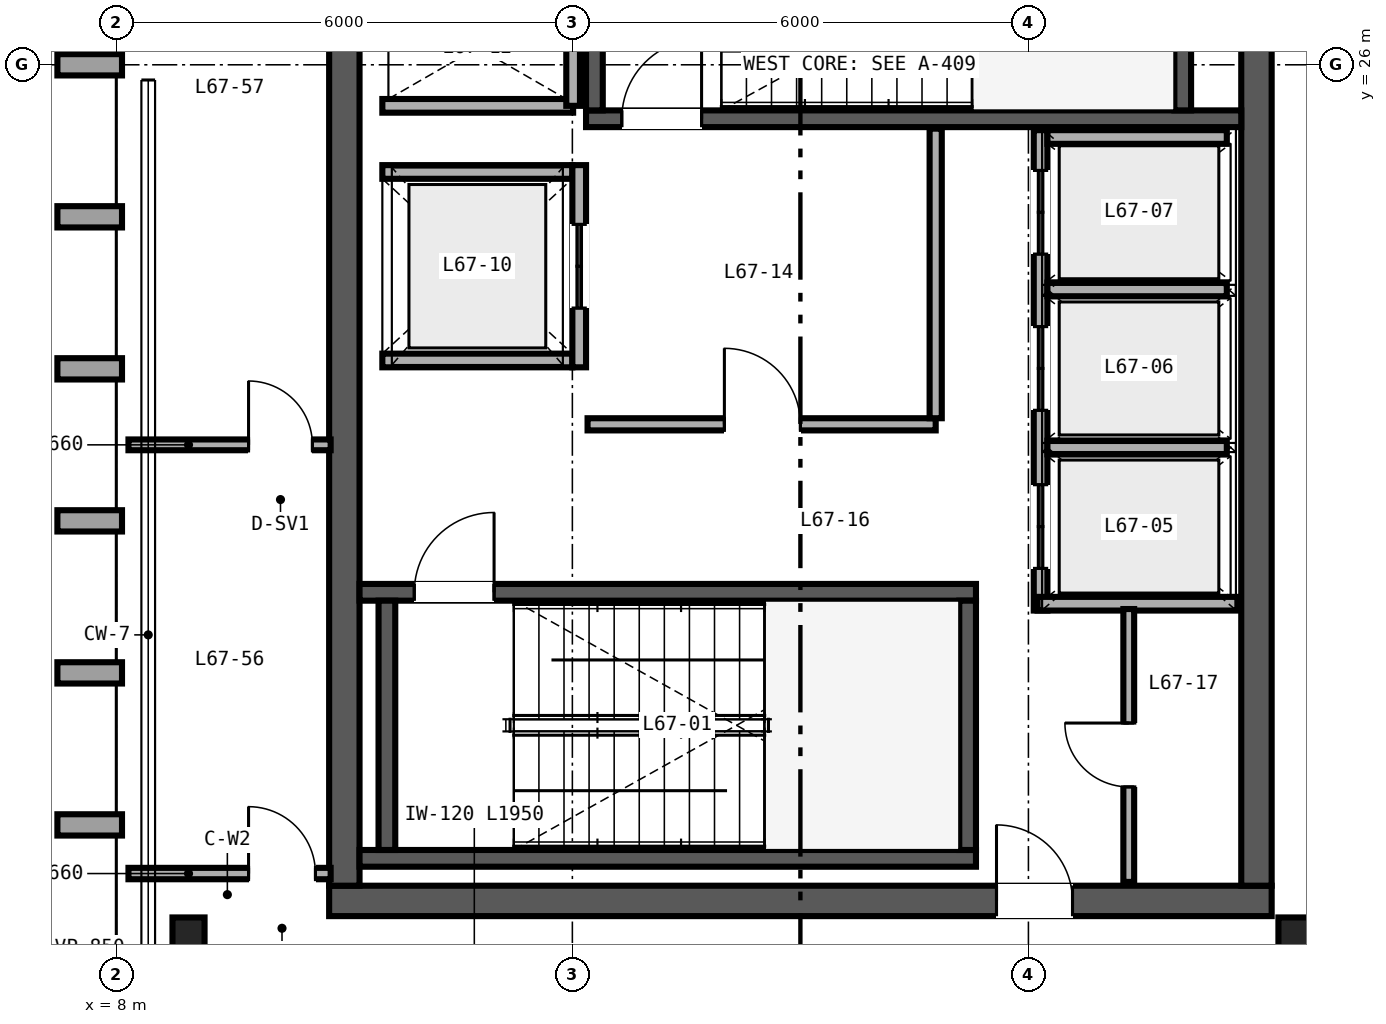
"""IFC4 building model, lengths in metres.
Left out: names, types, materials, properties, quantities, classifications, styles, units other than length and angle.
Written with IfcOpenShell. Run it as: python <this file> out.ifc"""

import sys

from ifc_helpers import new_model, si_unit, direction, frame, frame_2d, origin, origin_2d, place, context, subcontext, project, spatial, rectangle, i_section, extrude, source, transform, mapped, element, fill, save


model = new_model("IFC4")
c1 = context("Model", 3, precision=1e-05, world=origin(), true_north=direction((0.0, 1.0)))
c2 = subcontext(c1, "Body", "Model", "MODEL_VIEW")
j1 = project(units=[si_unit("LENGTHUNIT", "METRE"), si_unit("PLANEANGLEUNIT", "RADIAN")], contexts=[c1])
p1 = place(None, origin())
s1 = spatial("IfcSite", under=j1, at=p1, CompositionType="ELEMENT")
p2 = place(p1, origin())
s2 = spatial("IfcBuilding", under=s1, at=p2, CompositionType="ELEMENT")
p3 = place(p2, frame((0.0, 0.0, 265.2)))
s3 = spatial("IfcBuildingStorey", under=s2, at=p3, CompositionType="ELEMENT", Elevation=265.2)
p4 = place(p3, frame((10.8, 15.0, 0.0), z_axis=(0.0, 0.0, 1.0), x_axis=(1.0, 0.0, 0.0)))
e1 = element("IfcWall", 1, at=p4, inside=s3, PredefinedType="SHEAR", context=c2, shape_type="SweptSolid", body=[
    extrude(rectangle(XDim=12.4, YDim=0.4, at=frame_2d((6.2, 0.0))), origin(), (0.0, 0.0, 1.0), 3.38),
])
p5 = place(p4, frame((8.78, 0.0, 0.0)))
e2 = element("IfcOpeningElement", 2, at=p5, cuts=e1, PredefinedType="OPENING", context=c2, shape_type="SweptSolid", body=[
    extrude(rectangle(XDim=1.0, YDim=2.15, at=frame_2d((0.5, 1.075))), frame((0.0, 0.21, 0.0), z_axis=(0.0, -1.0, 0.0), x_axis=(1.0, 0.0, 0.0)), (0.0, 0.0, 1.0), 0.42),
])
for number, where, z_axis, x_axis in (
    (3, (11.0, 15.2, 0.0), (0.0, 0.0, 1.0), (0.0, 1.0, 0.0)),
    (4, (23.0, 15.2, 0.0), (0.0, 0.0, 1.0), (0.0, 1.0, 0.0)),
):
    element("IfcWall", number, at=place(p3, frame(where, z_axis=z_axis, x_axis=x_axis)), inside=s3, PredefinedType="SHEAR", context=c2, shape_type="SweptSolid", body=[
        extrude(rectangle(XDim=21.6, YDim=0.4, at=frame_2d((10.8, 0.0))), origin(), (0.0, 0.0, 1.0), 3.38),
    ])
p6 = place(p3, frame((11.2, 15.56, 0.0), z_axis=(0.0, 0.0, 1.0), x_axis=(1.0, 0.0, 0.0)))
e5 = element("IfcWall", 5, at=p6, inside=s3, PredefinedType="SHEAR", context=c2, shape_type="SweptSolid", body=[
    extrude(rectangle(XDim=8.11, YDim=0.22, at=frame_2d((4.055, 0.0))), origin(), (0.0, 0.0, 1.0), 3.4),
])
p7 = place(p3, frame((11.2, 19.06, 0.0), z_axis=(0.0, 0.0, 1.0), x_axis=(1.0, 0.0, 0.0)))
e6 = element("IfcWall", 6, at=p7, inside=s3, PredefinedType="SHEAR", context=c2, shape_type="SweptSolid", body=[
    extrude(rectangle(XDim=8.11, YDim=0.22, at=frame_2d((4.055, 0.0))), origin(), (0.0, 0.0, 1.0), 3.4),
])
p8 = place(p7, frame((0.72, 0.0, 0.0)))
e7 = element("IfcOpeningElement", 7, at=p8, cuts=e6, PredefinedType="OPENING", context=c2, shape_type="SweptSolid", body=[
    extrude(rectangle(XDim=1.05, YDim=2.15, at=frame_2d((0.525, 1.075))), frame((0.0, 0.12, 0.0), z_axis=(0.0, -1.0, 0.0), x_axis=(1.0, 0.0, 0.0)), (0.0, 0.0, 1.0), 0.24),
])
for number, where, z_axis, x_axis in (
    (8, (11.56, 15.67, 0.0), (0.0, 0.0, 1.0), (0.0, 1.0, 0.0)),
    (9, (19.2, 15.67, 0.0), (0.0, 0.0, 1.0), (0.0, 1.0, 0.0)),
):
    element("IfcWall", number, at=place(p3, frame(where, z_axis=z_axis, x_axis=x_axis)), inside=s3, PredefinedType="SHEAR", context=c2, shape_type="SweptSolid", body=[
        extrude(rectangle(XDim=3.28, YDim=0.22, at=frame_2d((1.64, 0.0))), origin(), (0.0, 0.0, 1.0), 3.4),
    ])
p9 = place(p3, frame((14.18, 25.29, 0.0), z_axis=(0.0, 0.0, 1.0), x_axis=(1.0, 0.0, 0.0)))
e10 = element("IfcWall", 10, at=p9, inside=s3, PredefinedType="SHEAR", context=c2, shape_type="SweptSolid", body=[
    extrude(rectangle(XDim=8.62, YDim=0.22, at=frame_2d((4.31, 0.0))), origin(), (0.0, 0.0, 1.0), 3.4),
])
p10 = place(p9, frame((0.47, 0.0, 0.0)))
e11 = element("IfcOpeningElement", 11, at=p10, cuts=e10, PredefinedType="OPENING", context=c2, shape_type="SweptSolid", body=[
    extrude(rectangle(XDim=1.05, YDim=2.15, at=frame_2d((0.525, 1.075))), frame((0.0, 0.12, 0.0), z_axis=(0.0, -1.0, 0.0), x_axis=(1.0, 0.0, 0.0)), (0.0, 0.0, 1.0), 0.24),
])
for number, where, z_axis, x_axis in (
    (12, (14.29, 25.4, 0.0), (0.0, 0.0, 1.0), (0.0, 1.0, 0.0)),
    (13, (22.03, 25.4, 0.0), (0.0, 0.0, 1.0), (0.0, 1.0, 0.0)),
):
    element("IfcWall", number, at=place(p3, frame(where, z_axis=z_axis, x_axis=x_axis)), inside=s3, PredefinedType="SHEAR", context=c2, shape_type="SweptSolid", body=[
        extrude(rectangle(XDim=3.28, YDim=0.22, at=frame_2d((1.64, 0.0))), origin(), (0.0, 0.0, 1.0), 3.4),
    ])
m1 = source(origin(), c2, "Body", "SweptSolid", [
    extrude(i_section(OverallWidth=0.422, OverallDepth=0.465, WebThickness=0.045, FlangeThickness=0.073, FilletRadius=0.025, at=origin_2d()), origin(), (0.0, 0.0, 1.0), 3.38),
])
for number, where, z_axis, x_axis in (
    (14, (8.95, 14.55, 0.0), (0.0, 0.0, 1.0), (1.0, 0.0, 0.0)),
    (15, (23.5, 14.55, 0.0), (0.0, 0.0, 1.0), (1.0, 0.0, 0.0)),
):
    element("IfcColumn", number, at=place(p3, frame(where, z_axis=z_axis, x_axis=x_axis)), inside=s3, PredefinedType="COLUMN", context=c2, shape_type="MappedRepresentation", body=[
        mapped(m1, transform((0.0, 0.0, 0.0), scale=1.0)),
    ])
p11 = place(p3, frame((20.16, 18.82, 0.0), z_axis=(0.0, 0.0, 1.0), x_axis=(0.0, 1.0, 0.0)))
e16 = element("IfcWall", 16, at=p11, inside=s3, PredefinedType="SOLIDWALL", context=c2, shape_type="SweptSolid", body=[
    extrude(rectangle(XDim=6.32, YDim=0.18, at=frame_2d((3.16, 0.0))), origin(), (0.0, 0.0, 1.0), 2.48),
])
p12 = place(p11, frame((0.555, 0.0, 0.0)))
e17 = element("IfcOpeningElement", 17, at=p12, cuts=e16, PredefinedType="OPENING", context=c2, shape_type="SweptSolid", body=[
    extrude(rectangle(XDim=1.1, YDim=2.2, at=frame_2d((0.55, 1.1))), frame((0.0, 0.1, 0.0), z_axis=(0.0, -1.0, 0.0), x_axis=(1.0, 0.0, 0.0)), (0.0, 0.0, 1.0), 0.2),
])
p13 = place(p11, frame((2.635, 0.0, 0.0)))
e18 = element("IfcOpeningElement", 18, at=p13, cuts=e16, PredefinedType="OPENING", context=c2, shape_type="SweptSolid", body=[
    extrude(rectangle(XDim=1.1, YDim=2.2, at=frame_2d((0.55, 1.1))), frame((0.0, 0.1, 0.0), z_axis=(0.0, -1.0, 0.0), x_axis=(1.0, 0.0, 0.0)), (0.0, 0.0, 1.0), 0.2),
])
p14 = place(p11, frame((4.69, 0.0, 0.0)))
e19 = element("IfcOpeningElement", 19, at=p14, cuts=e16, PredefinedType="OPENING", context=c2, shape_type="SweptSolid", body=[
    extrude(rectangle(XDim=1.1, YDim=2.2, at=frame_2d((0.55, 1.1))), frame((0.0, 0.1, 0.0), z_axis=(0.0, -1.0, 0.0), x_axis=(1.0, 0.0, 0.0)), (0.0, 0.0, 1.0), 0.2),
])
p15 = place(p3, frame((20.12, 18.91, 0.0), z_axis=(0.0, 0.0, 1.0), x_axis=(1.0, 0.0, 0.0)))
e20 = element("IfcWall", 20, at=p15, inside=s3, PredefinedType="SOLIDWALL", context=c2, shape_type="SweptSolid", body=[
    extrude(rectangle(XDim=2.63, YDim=0.18, at=frame_2d((1.315, 0.0))), origin(), (0.0, 0.0, 1.0), 3.38),
])
p16 = place(p3, frame((20.25, 25.05, 0.0), z_axis=(0.0, 0.0, 1.0), x_axis=(1.0, 0.0, 0.0)))
e21 = element("IfcWall", 21, at=p16, inside=s3, PredefinedType="SOLIDWALL", context=c2, shape_type="SweptSolid", body=[
    extrude(rectangle(XDim=2.36, YDim=0.18, at=frame_2d((1.18, 0.0))), origin(), (0.0, 0.0, 1.0), 3.38),
])
p17 = place(p3, frame((20.25, 20.965, 0.0), z_axis=(0.0, 0.0, 1.0), x_axis=(1.0, 0.0, 0.0)))
e22 = element("IfcWall", 22, at=p17, inside=s3, PredefinedType="SOLIDWALL", context=c2, shape_type="SweptSolid", body=[
    extrude(rectangle(XDim=2.36, YDim=0.18, at=frame_2d((1.18, 0.0))), origin(), (0.0, 0.0, 1.0), 2.48),
])
p18 = place(p3, frame((20.25, 23.045, 0.0), z_axis=(0.0, 0.0, 1.0), x_axis=(1.0, 0.0, 0.0)))
e23 = element("IfcWall", 23, at=p18, inside=s3, PredefinedType="SOLIDWALL", context=c2, shape_type="SweptSolid", body=[
    extrude(rectangle(XDim=2.36, YDim=0.18, at=frame_2d((1.18, 0.0))), origin(), (0.0, 0.0, 1.0), 3.38),
])
for number, where, z_axis, x_axis in (
    (24, (11.5, 22.11, 0.0), (0.0, 0.0, 1.0), (1.0, 0.0, 0.0)),
    (25, (11.5, 24.59, 0.0), (0.0, 0.0, 1.0), (1.0, 0.0, 0.0)),
):
    element("IfcWall", number, at=place(p3, frame(where, z_axis=z_axis, x_axis=x_axis)), inside=s3, PredefinedType="SOLIDWALL", context=c2, shape_type="SweptSolid", body=[
        extrude(rectangle(XDim=2.5, YDim=0.18, at=frame_2d((1.25, 0.0))), origin(), (0.0, 0.0, 1.0), 3.38),
    ])
p19 = place(p3, frame((14.09, 22.02, 0.0), z_axis=(0.0, 0.0, 1.0), x_axis=(0.0, 1.0, 0.0)))
e26 = element("IfcWall", 26, at=p19, inside=s3, PredefinedType="SOLIDWALL", context=c2, shape_type="SweptSolid", body=[
    extrude(rectangle(XDim=2.66, YDim=0.18, at=frame_2d((1.33, 0.0))), origin(), (0.0, 0.0, 1.0), 3.38),
])
p20 = place(p19, frame((0.78, 0.0, 0.0)))
e27 = element("IfcOpeningElement", 27, at=p20, cuts=e26, PredefinedType="OPENING", context=c2, shape_type="SweptSolid", body=[
    extrude(rectangle(XDim=1.1, YDim=2.2, at=frame_2d((0.55, 1.1))), frame((0.0, 0.1, 0.0), z_axis=(0.0, -1.0, 0.0), x_axis=(1.0, 0.0, 0.0)), (0.0, 0.0, 1.0), 0.2),
])
p21 = place(p3, frame((11.5, 25.46, 0.0), z_axis=(0.0, 0.0, 1.0), x_axis=(1.0, 0.0, 0.0)))
e28 = element("IfcWall", 28, at=p21, inside=s3, PredefinedType="SOLIDWALL", context=c2, shape_type="SweptSolid", body=[
    extrude(rectangle(XDim=2.51, YDim=0.18, at=frame_2d((1.255, 0.0))), origin(), (0.0, 0.0, 1.0), 3.38),
])
p22 = place(p3, frame((14.01, 25.46, 0.0), z_axis=(0.0, 0.0, 1.0), x_axis=(0.0, 1.0, 0.0)))
e29 = element("IfcWall", 29, at=p22, inside=s3, PredefinedType="SOLIDWALL", context=c2, shape_type="SweptSolid", body=[
    extrude(rectangle(XDim=3.08, YDim=0.18, at=frame_2d((1.54, 0.0))), origin(), (0.0, 0.0, 1.0), 3.38),
])
p23 = place(p3, frame((14.2, 21.27, 0.0), z_axis=(0.0, 0.0, 1.0), x_axis=(1.0, 0.0, 0.0)))
e30 = element("IfcWall", 30, at=p23, inside=s3, PredefinedType="PARTITIONING", context=c2, shape_type="SweptSolid", body=[
    extrude(rectangle(XDim=4.58, YDim=0.16, at=frame_2d((2.29, 0.0))), origin(), (0.0, 0.0, 1.0), 3.38),
])
p24 = place(p23, frame((1.8, 0.0, 0.0)))
e31 = element("IfcOpeningElement", 31, at=p24, cuts=e30, PredefinedType="OPENING", context=c2, shape_type="SweptSolid", body=[
    extrude(rectangle(XDim=1.0, YDim=2.15, at=frame_2d((0.5, 1.075))), frame((0.0, 0.09, 0.0), z_axis=(0.0, -1.0, 0.0), x_axis=(1.0, 0.0, 0.0)), (0.0, 0.0, 1.0), 0.18),
])
p25 = place(p3, frame((18.78, 21.35, 0.0), z_axis=(0.0, 0.0, 1.0), x_axis=(0.0, 1.0, 0.0)))
e32 = element("IfcWall", 32, at=p25, inside=s3, PredefinedType="PARTITIONING", context=c2, shape_type="SweptSolid", body=[
    extrude(rectangle(XDim=3.81, YDim=0.16, at=frame_2d((1.905, 0.0))), origin(), (0.0, 0.0, 1.0), 3.38),
])
p26 = place(p3, frame((21.32, 15.25, 0.0), z_axis=(0.0, 0.0, 1.0), x_axis=(0.0, 1.0, 0.0)))
e33 = element("IfcWall", 33, at=p26, inside=s3, PredefinedType="PARTITIONING", context=c2, shape_type="SweptSolid", body=[
    extrude(rectangle(XDim=3.59, YDim=0.142, at=frame_2d((1.795, 0.0))), origin(), (0.0, 0.0, 1.0), 3.38),
])
p27 = place(p26, frame((1.25, 0.0, 0.0)))
e34 = element("IfcOpeningElement", 34, at=p27, cuts=e33, PredefinedType="OPENING", context=c2, shape_type="SweptSolid", body=[
    extrude(rectangle(XDim=0.84, YDim=2.1, at=frame_2d((0.42, 1.05))), frame((0.0, 0.081, 0.0), z_axis=(0.0, -1.0, 0.0), x_axis=(1.0, 0.0, 0.0)), (0.0, 0.0, 1.0), 0.162),
])
p28 = place(p3, frame((8.16, 15.36, 0.0), z_axis=(0.0, 0.0, 1.0), x_axis=(1.0, 0.0, 0.0)))
e35 = element("IfcWall", 35, at=p28, inside=s3, PredefinedType="PARTITIONING", context=c2, shape_type="SweptSolid", body=[
    extrude(rectangle(XDim=2.66, YDim=0.15, at=frame_2d((1.33, 0.0))), origin(), (0.0, 0.0, 1.0), 2.601),
])
p29 = place(p28, frame((1.58, 0.0, 0.0)))
e36 = element("IfcOpeningElement", 36, at=p29, cuts=e35, PredefinedType="OPENING", context=c2, shape_type="SweptSolid", body=[
    extrude(rectangle(XDim=0.88, YDim=2.15, at=frame_2d((0.44, 1.075))), frame((0.0, 0.085, 0.0), z_axis=(0.0, -1.0, 0.0), x_axis=(1.0, 0.0, 0.0)), (0.0, 0.0, 1.0), 0.17),
])
p30 = place(p3, frame((8.16, 21.0, 0.0), z_axis=(0.0, 0.0, 1.0), x_axis=(1.0, 0.0, 0.0)))
e37 = element("IfcWall", 37, at=p30, inside=s3, PredefinedType="PARTITIONING", context=c2, shape_type="SweptSolid", body=[
    extrude(rectangle(XDim=2.66, YDim=0.142, at=frame_2d((1.33, 0.0))), origin(), (0.0, 0.0, 1.0), 2.48),
])
p31 = place(p30, frame((1.58, 0.0, 0.0)))
e38 = element("IfcOpeningElement", 38, at=p31, cuts=e37, PredefinedType="OPENING", context=c2, shape_type="SweptSolid", body=[
    extrude(rectangle(XDim=0.84, YDim=2.1, at=frame_2d((0.42, 1.05))), frame((0.0, 0.081, 0.0), z_axis=(0.0, -1.0, 0.0), x_axis=(1.0, 0.0, 0.0)), (0.0, 0.0, 1.0), 0.162),
])
m2 = source(origin(), c2, "Body", "SweptSolid", [
    extrude(rectangle(XDim=1.05, YDim=2.15, at=frame_2d((0.525, 1.075))), frame((0.0, 0.025, 0.0), z_axis=(0.0, -1.0, 0.0), x_axis=(1.0, 0.0, 0.0)), (0.0, 0.0, 1.0), 0.05),
])
p32 = place(p8, origin())
e39 = element("IfcDoor", 39, at=p32, inside=s3, OperationType="SINGLE_SWING_RIGHT", PredefinedType="DOOR", context=c2, shape_type="MappedRepresentation", body=[
    mapped(m2, transform((0.0, 0.0, 0.0), scale=1.0)),
])
fill(e7, e39)
p33 = place(p10, origin())
e40 = element("IfcDoor", 40, at=p33, inside=s3, OperationType="SINGLE_SWING_RIGHT", PredefinedType="DOOR", context=c2, shape_type="MappedRepresentation", body=[
    mapped(m2, transform((0.0, 0.0, 0.0), scale=1.0)),
])
fill(e11, e40)
m3 = source(origin(), c2, "Body", "SweptSolid", [
    extrude(rectangle(XDim=1.1, YDim=2.2, at=frame_2d((0.55, 1.1))), frame((0.0, 0.025, 0.0), z_axis=(0.0, -1.0, 0.0), x_axis=(1.0, 0.0, 0.0)), (0.0, 0.0, 1.0), 0.05),
])
p34 = place(p12, origin())
e41 = element("IfcDoor", 41, at=p34, inside=s3, OperationType="DOUBLE_DOOR_SLIDING", PredefinedType="DOOR", context=c2, shape_type="MappedRepresentation", body=[
    mapped(m3, transform((0.0, 0.0, 0.0), scale=1.0)),
])
fill(e17, e41)
p35 = place(p13, origin())
e42 = element("IfcDoor", 42, at=p35, inside=s3, OperationType="DOUBLE_DOOR_SLIDING", PredefinedType="DOOR", context=c2, shape_type="MappedRepresentation", body=[
    mapped(m3, transform((0.0, 0.0, 0.0), scale=1.0)),
])
fill(e18, e42)
p36 = place(p14, origin())
e43 = element("IfcDoor", 43, at=p36, inside=s3, OperationType="DOUBLE_DOOR_SLIDING", PredefinedType="DOOR", context=c2, shape_type="MappedRepresentation", body=[
    mapped(m3, transform((0.0, 0.0, 0.0), scale=1.0)),
])
fill(e19, e43)
p37 = place(p20, origin())
e44 = element("IfcDoor", 44, at=p37, inside=s3, OperationType="DOUBLE_DOOR_SLIDING", PredefinedType="DOOR", context=c2, shape_type="MappedRepresentation", body=[
    mapped(m3, transform((0.0, 0.0, 0.0), scale=1.0)),
])
fill(e27, e44)
m4 = source(origin(), c2, "Body", "SweptSolid", [
    extrude(rectangle(XDim=1.0, YDim=2.15, at=frame_2d((0.5, 1.075))), frame((0.0, 0.025, 0.0), z_axis=(0.0, -1.0, 0.0), x_axis=(1.0, 0.0, 0.0)), (0.0, 0.0, 1.0), 0.05),
])
p38 = place(p24, origin())
e45 = element("IfcDoor", 45, at=p38, inside=s3, OperationType="SINGLE_SWING_LEFT", PredefinedType="DOOR", context=c2, shape_type="MappedRepresentation", body=[
    mapped(m4, transform((0.0, 0.0, 0.0), scale=1.0)),
])
fill(e31, e45)
m5 = source(origin(), c2, "Body", "SweptSolid", [
    extrude(rectangle(XDim=0.84, YDim=2.1, at=frame_2d((0.42, 1.05))), frame((0.0, 0.025, 0.0), z_axis=(0.0, -1.0, 0.0), x_axis=(1.0, 0.0, 0.0)), (0.0, 0.0, 1.0), 0.05),
])
p39 = place(p27, origin())
e46 = element("IfcDoor", 46, at=p39, inside=s3, OperationType="SINGLE_SWING_RIGHT", PredefinedType="DOOR", context=c2, shape_type="MappedRepresentation", body=[
    mapped(m5, transform((0.0, 0.0, 0.0), scale=1.0)),
])
fill(e34, e46)
p40 = place(p5, origin())
e47 = element("IfcDoor", 47, at=p40, inside=s3, OperationType="SINGLE_SWING_LEFT", PredefinedType="DOOR", context=c2, shape_type="MappedRepresentation", body=[
    mapped(m4, transform((0.0, 0.0, 0.0), scale=1.0)),
])
fill(e2, e47)
m6 = source(origin(), c2, "Body", "SweptSolid", [
    extrude(rectangle(XDim=0.88, YDim=2.15, at=frame_2d((0.44, 1.075))), frame((0.0, 0.025, 0.0), z_axis=(0.0, -1.0, 0.0), x_axis=(1.0, 0.0, 0.0)), (0.0, 0.0, 1.0), 0.05),
])
p41 = place(p29, origin())
e48 = element("IfcDoor", 48, at=p41, inside=s3, OperationType="SINGLE_SWING_LEFT", PredefinedType="DOOR", context=c2, shape_type="MappedRepresentation", body=[
    mapped(m6, transform((0.0, 0.0, 0.0), scale=1.0)),
])
fill(e36, e48)
p42 = place(p31, origin())
e49 = element("IfcDoor", 49, at=p42, inside=s3, OperationType="SINGLE_SWING_LEFT", PredefinedType="DOOR", context=c2, shape_type="MappedRepresentation", body=[
    mapped(m5, transform((0.0, 0.0, 0.0), scale=1.0)),
])
fill(e38, e49)
save(model, sys.argv[1])
